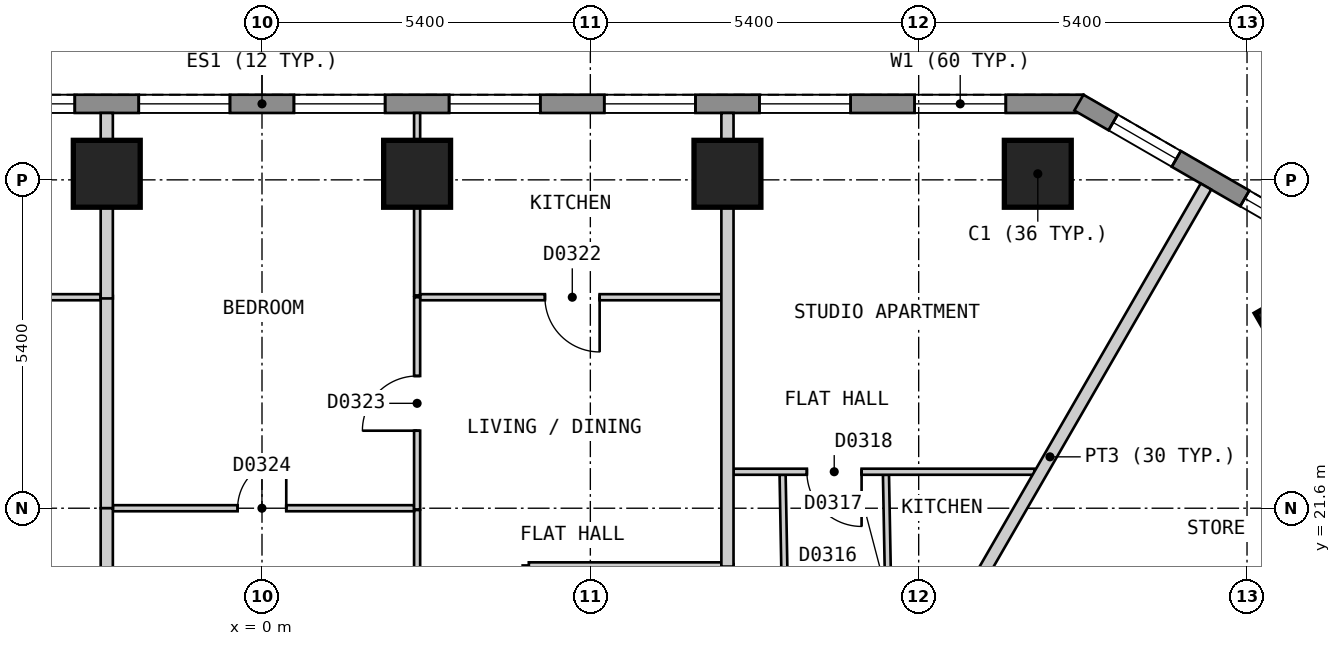
"""IFC4 building model, lengths in metres.
Left out: names, types, materials, properties, quantities, classifications, styles, units other than length and angle.
Written with IfcOpenShell. Run it as: python <this file> out.ifc"""

import sys

from ifc_helpers import new_model, si_unit, direction, frame, frame_2d, origin, origin_2d, place, context, subcontext, project, spatial, polyline, rectangle, outline, extrude, element, fill, save


model = new_model("IFC4")
c1 = context("Model", 3, precision=1e-05, world=origin(), true_north=direction((0.0, 1.0)))
c2 = subcontext(c1, "Body", "Model", "MODEL_VIEW")
j1 = project(units=[si_unit("LENGTHUNIT", "METRE"), si_unit("PLANEANGLEUNIT", "RADIAN")], contexts=[c1])
p1 = place(None, origin())
s1 = spatial("IfcSite", under=j1, at=p1, CompositionType="ELEMENT")
p2 = place(p1, origin())
s2 = spatial("IfcBuilding", under=s1, at=p2, CompositionType="ELEMENT")
p3 = place(p2, frame((0.0, 0.0, 59.4)))
s3 = spatial("IfcBuildingStorey", under=s2, at=p3, CompositionType="ELEMENT", Elevation=59.4)
for number, where, z_axis, x_axis in (
    (1, (12.759, 27.1, 0.0), (0.0, 0.0, 1.0), (-1.0, 0.0, 0.0)),
    (2, (7.655, 27.1, 0.0), (0.0, 0.0, 1.0), (-1.0, 0.0, 0.0)),
    (3, (2.551, 27.1, 0.0), (0.0, 0.0, 1.0), (-1.0, 0.0, 0.0)),
    (4, (-2.553, 27.1, 0.0), (0.0, 0.0, 1.0), (-1.0, 0.0, 0.0)),
    (5, (17.089, 24.601, 0.0), (0.0, 0.0, 1.0), (-0.5, 0.866, 0.0)),
):
    element("IfcColumn", number, at=place(p3, frame(where, z_axis=z_axis, x_axis=x_axis)), inside=s3, PredefinedType="COLUMN", context=c2, shape_type="SweptSolid", body=[
        extrude(rectangle(XDim=1.1, YDim=1.1, at=origin_2d()), origin(), (0.0, 0.0, 1.0), 3.0),
    ])
p4 = place(p3, frame((13.51, 28.25, 0.0), z_axis=(0.0, 0.0, 1.0), x_axis=(-1.0, 0.0, 0.0)))
e6 = element("IfcWall", 6, at=p4, inside=s3, PredefinedType="SOLIDWALL", context=c2, shape_type="SweptSolid", body=[
    extrude(outline(polyline([(0.0, -0.15), (27.02, -0.15), (26.94, 0.15), (0.08, 0.15), (0.0, -0.15)])), origin(), (0.0, 0.0, 1.0), 2.6),
])
p5 = place(p4, frame((1.277, 0.0, 0.15)))
e7 = element("IfcOpeningElement", 7, at=p5, cuts=e6, PredefinedType="OPENING", context=c2, shape_type="SweptSolid", body=[
    extrude(rectangle(XDim=1.5, YDim=2.1, at=frame_2d((0.75, 1.05))), frame((0.0, 0.16, 0.0), z_axis=(0.0, -1.0, 0.0), x_axis=(1.0, 0.0, 0.0)), (0.0, 0.0, 1.0), 0.32),
])
p6 = place(p4, frame((3.829, 0.0, 0.15)))
e8 = element("IfcOpeningElement", 8, at=p6, cuts=e6, PredefinedType="OPENING", context=c2, shape_type="SweptSolid", body=[
    extrude(rectangle(XDim=1.5, YDim=2.1, at=frame_2d((0.75, 1.05))), frame((0.0, 0.16, 0.0), z_axis=(0.0, -1.0, 0.0), x_axis=(1.0, 0.0, 0.0)), (0.0, 0.0, 1.0), 0.32),
])
p7 = place(p4, frame((6.381, 0.0, 0.15)))
e9 = element("IfcOpeningElement", 9, at=p7, cuts=e6, PredefinedType="OPENING", context=c2, shape_type="SweptSolid", body=[
    extrude(rectangle(XDim=1.5, YDim=2.1, at=frame_2d((0.75, 1.05))), frame((0.0, 0.16, 0.0), z_axis=(0.0, -1.0, 0.0), x_axis=(1.0, 0.0, 0.0)), (0.0, 0.0, 1.0), 0.32),
])
p8 = place(p4, frame((8.933, 0.0, 0.15)))
e10 = element("IfcOpeningElement", 10, at=p8, cuts=e6, PredefinedType="OPENING", context=c2, shape_type="SweptSolid", body=[
    extrude(rectangle(XDim=1.5, YDim=2.1, at=frame_2d((0.75, 1.05))), frame((0.0, 0.16, 0.0), z_axis=(0.0, -1.0, 0.0), x_axis=(1.0, 0.0, 0.0)), (0.0, 0.0, 1.0), 0.32),
])
p9 = place(p4, frame((11.485, 0.0, 0.15)))
e11 = element("IfcOpeningElement", 11, at=p9, cuts=e6, PredefinedType="OPENING", context=c2, shape_type="SweptSolid", body=[
    extrude(rectangle(XDim=1.5, YDim=2.1, at=frame_2d((0.75, 1.05))), frame((0.0, 0.16, 0.0), z_axis=(0.0, -1.0, 0.0), x_axis=(1.0, 0.0, 0.0)), (0.0, 0.0, 1.0), 0.32),
])
p10 = place(p4, frame((14.037, 0.0, 0.15)))
e12 = element("IfcOpeningElement", 12, at=p10, cuts=e6, PredefinedType="OPENING", context=c2, shape_type="SweptSolid", body=[
    extrude(rectangle(XDim=1.5, YDim=2.1, at=frame_2d((0.75, 1.05))), frame((0.0, 0.16, 0.0), z_axis=(0.0, -1.0, 0.0), x_axis=(1.0, 0.0, 0.0)), (0.0, 0.0, 1.0), 0.32),
])
p11 = place(p4, frame((16.589, 0.0, 0.15)))
e13 = element("IfcOpeningElement", 13, at=p11, cuts=e6, PredefinedType="OPENING", context=c2, shape_type="SweptSolid", body=[
    extrude(rectangle(XDim=1.5, YDim=2.1, at=frame_2d((0.75, 1.05))), frame((0.0, 0.16, 0.0), z_axis=(0.0, -1.0, 0.0), x_axis=(1.0, 0.0, 0.0)), (0.0, 0.0, 1.0), 0.32),
])
p12 = place(p4, frame((19.141, 0.0, 0.15)))
e14 = element("IfcOpeningElement", 14, at=p12, cuts=e6, PredefinedType="OPENING", context=c2, shape_type="SweptSolid", body=[
    extrude(rectangle(XDim=1.5, YDim=2.1, at=frame_2d((0.75, 1.05))), frame((0.0, 0.16, 0.0), z_axis=(0.0, -1.0, 0.0), x_axis=(1.0, 0.0, 0.0)), (0.0, 0.0, 1.0), 0.32),
])
p13 = place(p4, frame((21.693, 0.0, 0.15)))
e15 = element("IfcOpeningElement", 15, at=p13, cuts=e6, PredefinedType="OPENING", context=c2, shape_type="SweptSolid", body=[
    extrude(rectangle(XDim=1.5, YDim=2.1, at=frame_2d((0.75, 1.05))), frame((0.0, 0.16, 0.0), z_axis=(0.0, -1.0, 0.0), x_axis=(1.0, 0.0, 0.0)), (0.0, 0.0, 1.0), 0.32),
])
p14 = place(p4, frame((24.245, 0.0, 0.15)))
e16 = element("IfcOpeningElement", 16, at=p14, cuts=e6, PredefinedType="OPENING", context=c2, shape_type="SweptSolid", body=[
    extrude(rectangle(XDim=1.5, YDim=2.1, at=frame_2d((0.75, 1.05))), frame((0.0, 0.16, 0.0), z_axis=(0.0, -1.0, 0.0), x_axis=(1.0, 0.0, 0.0)), (0.0, 0.0, 1.0), 0.32),
])
p15 = place(p3, frame((17.765, 25.77, 0.0), z_axis=(0.0, 0.0, 1.0), x_axis=(-0.866010750942, 0.50002537861, 0.0)))
e17 = element("IfcWall", 17, at=p15, inside=s3, PredefinedType="SOLIDWALL", context=c2, shape_type="SweptSolid", body=[
    extrude(outline(polyline([(0.0, -0.15), (5.0, -0.15), (4.919, 0.15), (0.08, 0.15), (0.0, -0.15)])), origin(), (0.0, 0.0, 1.0), 2.6),
])
p16 = place(p15, frame((0.65, 0.0, 0.15)))
e18 = element("IfcOpeningElement", 18, at=p16, cuts=e17, PredefinedType="OPENING", context=c2, shape_type="SweptSolid", body=[
    extrude(rectangle(XDim=1.2, YDim=2.1, at=frame_2d((0.6, 1.05))), frame((0.0, 0.16, 0.0), z_axis=(0.0, -1.0, 0.0), x_axis=(1.0, 0.0, 0.0)), (0.0, 0.0, 1.0), 0.32),
])
p17 = place(p15, frame((3.15, 0.0, 0.15)))
e19 = element("IfcOpeningElement", 19, at=p17, cuts=e17, PredefinedType="OPENING", context=c2, shape_type="SweptSolid", body=[
    extrude(rectangle(XDim=1.2, YDim=2.1, at=frame_2d((0.6, 1.05))), frame((0.0, 0.16, 0.0), z_axis=(0.0, -1.0, 0.0), x_axis=(1.0, 0.0, 0.0)), (0.0, 0.0, 1.0), 0.32),
])
p18 = place(p3, frame((8.562, 22.15, 0.0), z_axis=(0.0, 0.0, 1.0), x_axis=(0.018504185939, -0.999828782894, 0.0)))
e20 = element("IfcWall", 20, at=p18, inside=s3, PredefinedType="PARTITIONING", context=c2, shape_type="SweptSolid", body=[
    extrude(rectangle(XDim=4.051, YDim=0.1, at=frame_2d((2.025, 0.0))), origin(), (0.0, 0.0, 1.0), 2.6),
])
p19 = place(p18, frame((1.65, 0.0, 0.0)))
e21 = element("IfcOpeningElement", 21, at=p19, cuts=e20, PredefinedType="OPENING", context=c2, shape_type="SweptSolid", body=[
    extrude(rectangle(XDim=0.8, YDim=2.1, at=frame_2d((0.4, 1.05))), frame((0.0, 0.06, 0.0), z_axis=(0.0, -1.0, 0.0), x_axis=(1.0, 0.0, 0.0)), (0.0, 0.0, 1.0), 0.12),
])
p20 = place(p3, frame((10.262, 22.15, 0.0), z_axis=(0.0, 0.0, 1.0), x_axis=(0.018696971826, -0.999825196344, 0.0)))
e22 = element("IfcWall", 22, at=p20, inside=s3, PredefinedType="PARTITIONING", context=c2, shape_type="SweptSolid", body=[
    extrude(rectangle(XDim=3.957, YDim=0.1, at=frame_2d((1.978, 0.0))), origin(), (0.0, 0.0, 1.0), 2.6),
])
p21 = place(p20, frame((1.6, 0.0, 0.0)))
e23 = element("IfcOpeningElement", 23, at=p21, cuts=e22, PredefinedType="OPENING", context=c2, shape_type="SweptSolid", body=[
    extrude(rectangle(XDim=0.9, YDim=2.1, at=frame_2d((0.45, 1.05))), frame((0.0, 0.06, 0.0), z_axis=(0.0, -1.0, 0.0), x_axis=(1.0, 0.0, 0.0)), (0.0, 0.0, 1.0), 0.12),
])
p22 = place(p3, frame((2.551, 28.1, 0.0), z_axis=(0.0, 0.0, 1.0), x_axis=(0.0, -1.0, 0.0)))
e24 = element("IfcWall", 24, at=p22, inside=s3, PredefinedType="PARTITIONING", context=c2, shape_type="SweptSolid", body=[
    extrude(rectangle(XDim=3.0, YDim=0.1, at=frame_2d((1.5, 0.0))), origin(), (0.0, 0.0, 1.0), 2.6),
])
p23 = place(p3, frame((2.551, 21.57, 0.0), z_axis=(0.0, 0.0, 1.0), x_axis=(0.0, -1.0, 0.0)))
e25 = element("IfcWall", 25, at=p23, inside=s3, PredefinedType="PARTITIONING", context=c2, shape_type="SweptSolid", body=[
    extrude(rectangle(XDim=3.47, YDim=0.1, at=frame_2d((1.735, 0.0))), origin(), (0.0, 0.0, 1.0), 2.6),
])
p24 = place(p3, frame((4.388, 20.66, 0.0), z_axis=(0.0, 0.0, 1.0), x_axis=(1.0, 0.0, 0.0)))
e26 = element("IfcWall", 26, at=p24, inside=s3, PredefinedType="PARTITIONING", context=c2, shape_type="SweptSolid", body=[
    extrude(rectangle(XDim=3.167, YDim=0.1, at=frame_2d((1.583, 0.0))), origin(), (0.0, 0.0, 1.0), 2.6),
])
p25 = place(p3, frame((-2.453, 21.6, 0.0), z_axis=(0.0, 0.0, 1.0), x_axis=(1.0, 0.0, 0.0)))
e27 = element("IfcWall", 27, at=p25, inside=s3, PredefinedType="PARTITIONING", context=c2, shape_type="SweptSolid", body=[
    extrude(rectangle(XDim=4.954, YDim=0.1, at=frame_2d((2.477, 0.0))), origin(), (0.0, 0.0, 1.0), 2.6),
])
p26 = place(p25, frame((2.052, 0.0, 0.0)))
e28 = element("IfcOpeningElement", 28, at=p26, cuts=e27, PredefinedType="OPENING", context=c2, shape_type="SweptSolid", body=[
    extrude(rectangle(XDim=0.8, YDim=2.1, at=frame_2d((0.4, 1.05))), frame((0.0, 0.06, 0.0), z_axis=(0.0, -1.0, 0.0), x_axis=(1.0, 0.0, 0.0)), (0.0, 0.0, 1.0), 0.12),
])
p27 = place(p3, frame((7.755, 22.2, 0.0), z_axis=(0.0, 0.0, 1.0), x_axis=(1.0, 0.0, 0.0)))
e29 = element("IfcWall", 29, at=p27, inside=s3, PredefinedType="PARTITIONING", context=c2, shape_type="SweptSolid", body=[
    extrude(rectangle(XDim=4.947, YDim=0.1, at=frame_2d((2.474, 0.0))), origin(), (0.0, 0.0, 1.0), 2.6),
])
p28 = place(p27, frame((1.206, 0.0, 0.0)))
e30 = element("IfcOpeningElement", 30, at=p28, cuts=e29, PredefinedType="OPENING", context=c2, shape_type="SweptSolid", body=[
    extrude(rectangle(XDim=0.9, YDim=2.1, at=frame_2d((0.45, 1.05))), frame((0.0, 0.06, 0.0), z_axis=(0.0, -1.0, 0.0), x_axis=(1.0, 0.0, 0.0)), (0.0, 0.0, 1.0), 0.12),
])
p29 = place(p3, frame((-7.607, 25.07, 0.0), z_axis=(0.0, 0.0, 1.0), x_axis=(1.0, 0.0, 0.0)))
e31 = element("IfcWall", 31, at=p29, inside=s3, PredefinedType="PARTITIONING", context=c2, shape_type="SweptSolid", body=[
    extrude(rectangle(XDim=4.954, YDim=0.1, at=frame_2d((2.477, 0.0))), origin(), (0.0, 0.0, 1.0), 2.6),
])
p30 = place(p29, frame((2.052, 0.0, 0.0)))
e32 = element("IfcOpeningElement", 32, at=p30, cuts=e31, PredefinedType="OPENING", context=c2, shape_type="SweptSolid", body=[
    extrude(rectangle(XDim=0.9, YDim=2.1, at=frame_2d((0.45, 1.05))), frame((0.0, 0.06, 0.0), z_axis=(0.0, -1.0, 0.0), x_axis=(1.0, 0.0, 0.0)), (0.0, 0.0, 1.0), 0.12),
])
p31 = place(p3, frame((2.601, 25.07, 0.0), z_axis=(0.0, 0.0, 1.0), x_axis=(1.0, 0.0, 0.0)))
e33 = element("IfcWall", 33, at=p31, inside=s3, PredefinedType="PARTITIONING", context=c2, shape_type="SweptSolid", body=[
    extrude(rectangle(XDim=4.954, YDim=0.1, at=frame_2d((2.477, 0.0))), origin(), (0.0, 0.0, 1.0), 2.6),
])
p32 = place(p31, frame((2.052, 0.0, 0.0)))
e34 = element("IfcOpeningElement", 34, at=p32, cuts=e33, PredefinedType="OPENING", context=c2, shape_type="SweptSolid", body=[
    extrude(rectangle(XDim=0.9, YDim=2.1, at=frame_2d((0.45, 1.05))), frame((0.0, 0.06, 0.0), z_axis=(0.0, -1.0, 0.0), x_axis=(1.0, 0.0, 0.0)), (0.0, 0.0, 1.0), 0.12),
])
p33 = place(p3, frame((4.337, 18.1, 0.0), z_axis=(0.0, 0.0, 1.0), x_axis=(0.0, 1.0, 0.0)))
e35 = element("IfcWall", 35, at=p33, inside=s3, PredefinedType="PARTITIONING", context=c2, shape_type="SweptSolid", body=[
    extrude(rectangle(XDim=2.559, YDim=0.1, at=frame_2d((1.279, 0.0))), origin(), (0.0, 0.0, 1.0), 2.6),
])
p34 = place(p33, frame((0.78, 0.0, 0.0)))
e36 = element("IfcOpeningElement", 36, at=p34, cuts=e35, PredefinedType="OPENING", context=c2, shape_type="SweptSolid", body=[
    extrude(rectangle(XDim=0.9, YDim=2.1, at=frame_2d((0.45, 1.05))), frame((0.0, 0.06, 0.0), z_axis=(0.0, -1.0, 0.0), x_axis=(1.0, 0.0, 0.0)), (0.0, 0.0, 1.0), 0.12),
])
p35 = place(p3, frame((2.551, 21.58, 0.0), z_axis=(0.0, 0.0, 1.0), x_axis=(0.0, 1.0, 0.0)))
e37 = element("IfcWall", 37, at=p35, inside=s3, PredefinedType="PARTITIONING", context=c2, shape_type="SweptSolid", body=[
    extrude(rectangle(XDim=3.49, YDim=0.1, at=frame_2d((1.745, 0.0))), origin(), (0.0, 0.0, 1.0), 2.6),
])
p36 = place(p35, frame((1.295, 0.0, 0.0)))
e38 = element("IfcOpeningElement", 38, at=p36, cuts=e37, PredefinedType="OPENING", context=c2, shape_type="SweptSolid", body=[
    extrude(rectangle(XDim=0.9, YDim=2.1, at=frame_2d((0.45, 1.05))), frame((0.0, 0.06, 0.0), z_axis=(0.0, -1.0, 0.0), x_axis=(1.0, 0.0, 0.0)), (0.0, 0.0, 1.0), 0.12),
])
p37 = place(p3, frame((-2.553, 25.09, 0.0), z_axis=(0.0, 0.0, 1.0), x_axis=(0.0, -1.0, 0.0)))
e39 = element("IfcWall", 39, at=p37, inside=s3, PredefinedType="PARTITIONING", context=c2, shape_type="SweptSolid", body=[
    extrude(rectangle(XDim=3.49, YDim=0.2, at=frame_2d((1.745, 0.0))), origin(), (0.0, 0.0, 1.0), 2.6),
])
p38 = place(p3, frame((7.655, 20.68, 0.0), z_axis=(0.0, 0.0, 1.0), x_axis=(0.0, -1.0, 0.0)))
e40 = element("IfcWall", 40, at=p38, inside=s3, PredefinedType="PARTITIONING", context=c2, shape_type="SweptSolid", body=[
    extrude(rectangle(XDim=2.58, YDim=0.2, at=frame_2d((1.29, 0.0))), origin(), (0.0, 0.0, 1.0), 2.6),
])
p39 = place(p3, frame((10.393, 18.0, 0.0), z_axis=(0.0, 0.0, 1.0), x_axis=(0.499945497007, 0.866056868816, 0.0)))
e41 = element("IfcWall", 41, at=p39, inside=s3, PredefinedType="PARTITIONING", context=c2, shape_type="SweptSolid", body=[
    extrude(rectangle(XDim=10.265, YDim=0.2, at=frame_2d((5.132, 0.0))), origin(), (0.0, 0.0, 1.0), 2.6),
])
p40 = place(p3, frame((7.655, 20.64, 0.0), z_axis=(0.0, 0.0, 1.0), x_axis=(0.0, 1.0, 0.0)))
e42 = element("IfcWall", 42, at=p40, inside=s3, PredefinedType="PARTITIONING", context=c2, shape_type="SweptSolid", body=[
    extrude(rectangle(XDim=7.46, YDim=0.2, at=frame_2d((3.73, 0.0))), origin(), (0.0, 0.0, 1.0), 2.6),
])
p41 = place(p3, frame((-2.553, 18.1, 0.0), z_axis=(0.0, 0.0, 1.0), x_axis=(0.0, 1.0, 0.0)))
e43 = element("IfcWall", 43, at=p41, inside=s3, PredefinedType="PARTITIONING", context=c2, shape_type="SweptSolid", body=[
    extrude(rectangle(XDim=3.5, YDim=0.2, at=frame_2d((1.75, 0.0))), origin(), (0.0, 0.0, 1.0), 2.6),
])
p42 = place(p3, frame((-2.553, 25.05, 0.0), z_axis=(0.0, 0.0, 1.0), x_axis=(0.0, 1.0, 0.0)))
e44 = element("IfcWall", 44, at=p42, inside=s3, PredefinedType="PARTITIONING", context=c2, shape_type="SweptSolid", body=[
    extrude(rectangle(XDim=3.05, YDim=0.2, at=frame_2d((1.525, 0.0))), origin(), (0.0, 0.0, 1.0), 2.6),
])
p43 = place(p3, frame((11.847, 15.681, 0.0), z_axis=(0.0, 0.0, 1.0), x_axis=(0.866022959057, 0.500004234368, 0.0)))
e45 = element("IfcWall", 45, at=p43, inside=s3, PredefinedType="PARTITIONING", context=c2, shape_type="SweptSolid", body=[
    extrude(rectangle(XDim=10.0, YDim=0.2, at=frame_2d((5.0, 0.0))), origin(), (0.0, 0.0, 1.0), 2.6),
])
p44 = place(p5, origin())
e46 = element("IfcWindow", 46, at=p44, inside=s3, PartitioningType="SINGLE_PANEL", PredefinedType="WINDOW", context=c2, shape_type="SweptSolid", body=[
    extrude(rectangle(XDim=1.5, YDim=2.1, at=frame_2d((0.75, 1.05))), frame((0.0, 0.03, 0.0), z_axis=(0.0, -1.0, 0.0), x_axis=(1.0, 0.0, 0.0)), (0.0, 0.0, 1.0), 0.06),
])
fill(e7, e46)
p45 = place(p6, origin())
e47 = element("IfcWindow", 47, at=p45, inside=s3, PartitioningType="SINGLE_PANEL", PredefinedType="WINDOW", context=c2, shape_type="SweptSolid", body=[
    extrude(rectangle(XDim=1.5, YDim=2.1, at=frame_2d((0.75, 1.05))), frame((0.0, 0.03, 0.0), z_axis=(0.0, -1.0, 0.0), x_axis=(1.0, 0.0, 0.0)), (0.0, 0.0, 1.0), 0.06),
])
fill(e8, e47)
p46 = place(p7, origin())
e48 = element("IfcWindow", 48, at=p46, inside=s3, PartitioningType="SINGLE_PANEL", PredefinedType="WINDOW", context=c2, shape_type="SweptSolid", body=[
    extrude(rectangle(XDim=1.5, YDim=2.1, at=frame_2d((0.75, 1.05))), frame((0.0, 0.03, 0.0), z_axis=(0.0, -1.0, 0.0), x_axis=(1.0, 0.0, 0.0)), (0.0, 0.0, 1.0), 0.06),
])
fill(e9, e48)
p47 = place(p8, origin())
e49 = element("IfcWindow", 49, at=p47, inside=s3, PartitioningType="SINGLE_PANEL", PredefinedType="WINDOW", context=c2, shape_type="SweptSolid", body=[
    extrude(rectangle(XDim=1.5, YDim=2.1, at=frame_2d((0.75, 1.05))), frame((0.0, 0.03, 0.0), z_axis=(0.0, -1.0, 0.0), x_axis=(1.0, 0.0, 0.0)), (0.0, 0.0, 1.0), 0.06),
])
fill(e10, e49)
p48 = place(p9, origin())
e50 = element("IfcWindow", 50, at=p48, inside=s3, PartitioningType="SINGLE_PANEL", PredefinedType="WINDOW", context=c2, shape_type="SweptSolid", body=[
    extrude(rectangle(XDim=1.5, YDim=2.1, at=frame_2d((0.75, 1.05))), frame((0.0, 0.03, 0.0), z_axis=(0.0, -1.0, 0.0), x_axis=(1.0, 0.0, 0.0)), (0.0, 0.0, 1.0), 0.06),
])
fill(e11, e50)
p49 = place(p10, origin())
e51 = element("IfcWindow", 51, at=p49, inside=s3, PartitioningType="SINGLE_PANEL", PredefinedType="WINDOW", context=c2, shape_type="SweptSolid", body=[
    extrude(rectangle(XDim=1.5, YDim=2.1, at=frame_2d((0.75, 1.05))), frame((0.0, 0.03, 0.0), z_axis=(0.0, -1.0, 0.0), x_axis=(1.0, 0.0, 0.0)), (0.0, 0.0, 1.0), 0.06),
])
fill(e12, e51)
p50 = place(p11, origin())
e52 = element("IfcWindow", 52, at=p50, inside=s3, PartitioningType="SINGLE_PANEL", PredefinedType="WINDOW", context=c2, shape_type="SweptSolid", body=[
    extrude(rectangle(XDim=1.5, YDim=2.1, at=frame_2d((0.75, 1.05))), frame((0.0, 0.03, 0.0), z_axis=(0.0, -1.0, 0.0), x_axis=(1.0, 0.0, 0.0)), (0.0, 0.0, 1.0), 0.06),
])
fill(e13, e52)
p51 = place(p16, origin())
e53 = element("IfcWindow", 53, at=p51, inside=s3, PartitioningType="SINGLE_PANEL", PredefinedType="WINDOW", context=c2, shape_type="SweptSolid", body=[
    extrude(rectangle(XDim=1.2, YDim=2.1, at=frame_2d((0.6, 1.05))), frame((0.0, 0.03, 0.0), z_axis=(0.0, -1.0, 0.0), x_axis=(1.0, 0.0, 0.0)), (0.0, 0.0, 1.0), 0.06),
])
fill(e18, e53)
p52 = place(p17, origin())
e54 = element("IfcWindow", 54, at=p52, inside=s3, PartitioningType="SINGLE_PANEL", PredefinedType="WINDOW", context=c2, shape_type="SweptSolid", body=[
    extrude(rectangle(XDim=1.2, YDim=2.1, at=frame_2d((0.6, 1.05))), frame((0.0, 0.03, 0.0), z_axis=(0.0, -1.0, 0.0), x_axis=(1.0, 0.0, 0.0)), (0.0, 0.0, 1.0), 0.06),
])
fill(e19, e54)
p53 = place(p28, origin())
e55 = element("IfcDoor", 55, at=p53, inside=s3, OperationType="SINGLE_SWING_RIGHT", PredefinedType="DOOR", context=c2, shape_type="SweptSolid", body=[
    extrude(rectangle(XDim=0.9, YDim=2.1, at=frame_2d((0.45, 1.05))), frame((0.0, 0.025, 0.0), z_axis=(0.0, -1.0, 0.0), x_axis=(1.0, 0.0, 0.0)), (0.0, 0.0, 1.0), 0.05),
])
fill(e30, e55)
p54 = place(p32, origin())
e56 = element("IfcDoor", 56, at=p54, inside=s3, OperationType="SINGLE_SWING_RIGHT", PredefinedType="DOOR", context=c2, shape_type="SweptSolid", body=[
    extrude(rectangle(XDim=0.9, YDim=2.1, at=frame_2d((0.45, 1.05))), frame((0.0, 0.025, 0.0), z_axis=(0.0, -1.0, 0.0), x_axis=(1.0, 0.0, 0.0)), (0.0, 0.0, 1.0), 0.05),
])
fill(e34, e56)
p55 = place(p36, origin())
e57 = element("IfcDoor", 57, at=p55, inside=s3, OperationType="SINGLE_SWING_LEFT", PredefinedType="DOOR", context=c2, shape_type="SweptSolid", body=[
    extrude(rectangle(XDim=0.9, YDim=2.1, at=frame_2d((0.45, 1.05))), frame((0.0, 0.025, 0.0), z_axis=(0.0, -1.0, 0.0), x_axis=(1.0, 0.0, 0.0)), (0.0, 0.0, 1.0), 0.05),
])
fill(e38, e57)
p56 = place(p26, origin())
e58 = element("IfcDoor", 58, at=p56, inside=s3, OperationType="SINGLE_SWING_RIGHT", PredefinedType="DOOR", context=c2, shape_type="SweptSolid", body=[
    extrude(rectangle(XDim=0.8, YDim=2.1, at=frame_2d((0.4, 1.05))), frame((0.0, 0.025, 0.0), z_axis=(0.0, -1.0, 0.0), x_axis=(1.0, 0.0, 0.0)), (0.0, 0.0, 1.0), 0.05),
])
fill(e28, e58)
save(model, sys.argv[1])
